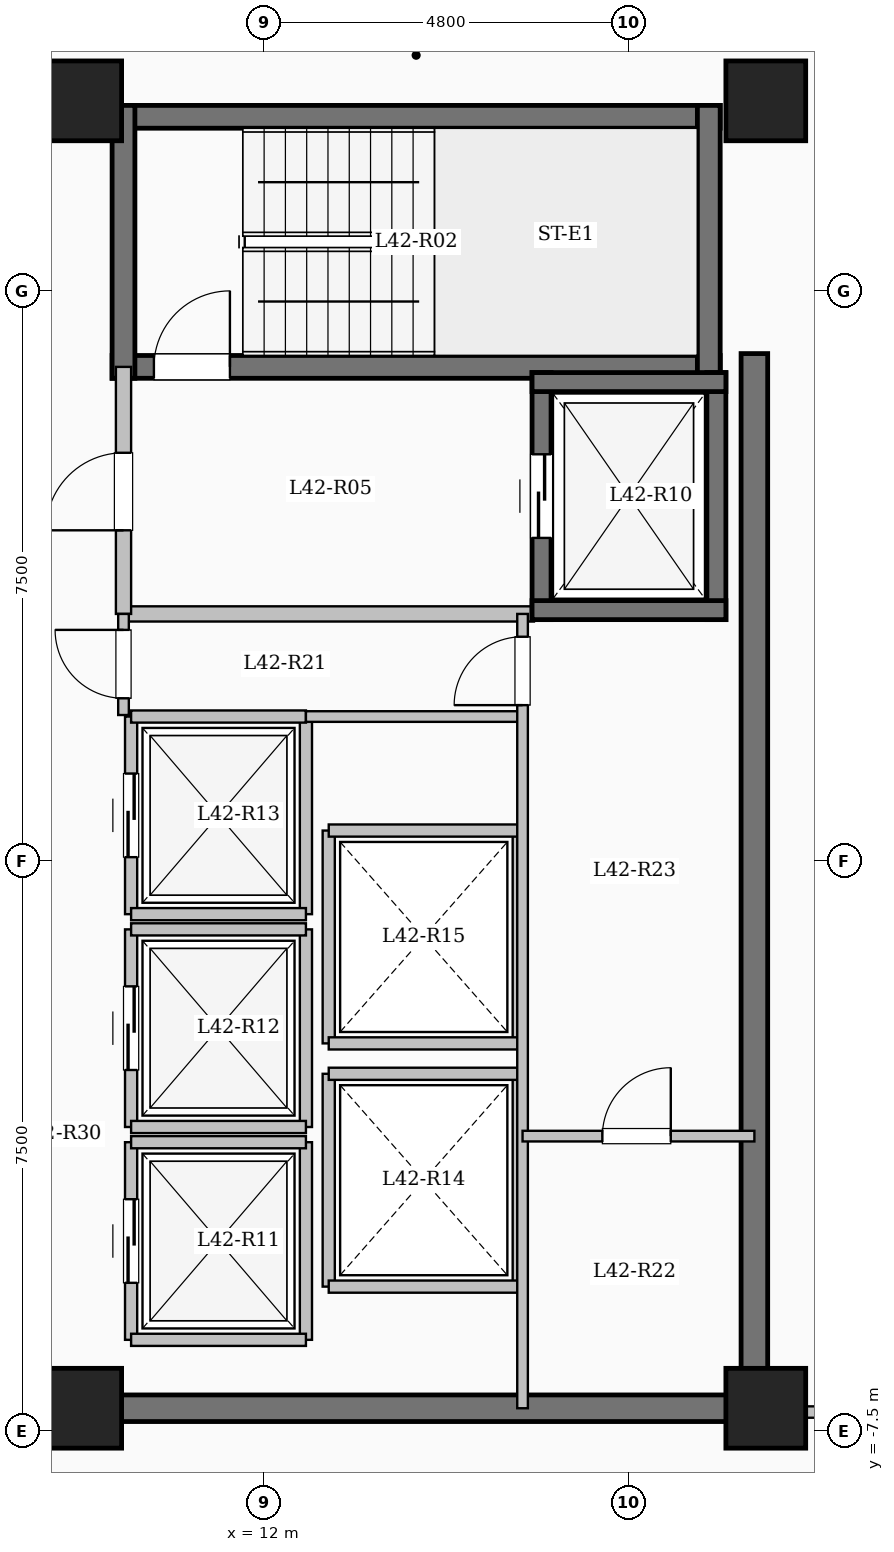
"""IFC4 building model, lengths in metres.
Left out: names, types, materials, properties, quantities, classifications, styles, units other than length and angle.
Written with IfcOpenShell. Run it as: python <this file> out.ifc"""

import sys

from ifc_helpers import new_model, si_unit, direction, frame, frame_2d, origin, origin_2d, place, context, subcontext, project, spatial, rectangle, extrude, element, fill, save


model = new_model("IFC4")
c1 = context("Model", 3, precision=1e-05, world=origin(), true_north=direction((0.0, 1.0)))
c2 = subcontext(c1, "Body", "Model", "MODEL_VIEW")
j1 = project(units=[si_unit("LENGTHUNIT", "METRE"), si_unit("PLANEANGLEUNIT", "RADIAN")], contexts=[c1])
p1 = place(None, origin())
s1 = spatial("IfcSite", under=j1, at=p1, CompositionType="ELEMENT")
p2 = place(p1, origin())
s2 = spatial("IfcBuilding", under=s1, at=p2, CompositionType="ELEMENT")
p3 = place(p2, frame((0.0, 0.0, 156.05)))
s3 = spatial("IfcBuildingStorey", under=s2, at=p3, CompositionType="ELEMENT", Elevation=156.05)
for number, where, z_axis, x_axis in (
    (1, (9.6, -7.2, 0.0), (0.0, 0.0, 1.0), (1.0, 0.0, 0.0)),
    (2, (9.6, 10.0, 0.0), (0.0, 0.0, 1.0), (1.0, 0.0, 0.0)),
    (3, (18.6, -7.2, 0.0), (0.0, 0.0, 1.0), (1.0, 0.0, 0.0)),
    (4, (18.6, 10.0, 0.0), (0.0, 0.0, 1.0), (1.0, 0.0, 0.0)),
):
    element("IfcColumn", number, at=place(p3, frame(where, z_axis=z_axis, x_axis=x_axis)), inside=s3, PredefinedType="COLUMN", context=c2, shape_type="SweptSolid", body=[
        extrude(rectangle(XDim=1.05, YDim=1.05, at=origin_2d()), origin(), (0.0, 0.0, 1.0), 3.35),
    ])
p4 = place(p3, frame((10.0, 9.79, 0.0), z_axis=(0.0, 0.0, 1.0), x_axis=(1.0, 0.0, 0.0)))
e5 = element("IfcWall", 5, at=p4, inside=s3, PredefinedType="SHEAR", context=c2, shape_type="SweptSolid", body=[
    extrude(rectangle(XDim=8.0, YDim=0.3, at=frame_2d((4.0, 0.0))), origin(), (0.0, 0.0, 1.0), 3.35),
])
p5 = place(p3, frame((10.0, 6.5, 0.0), z_axis=(0.0, 0.0, 1.0), x_axis=(1.0, 0.0, 0.0)))
e6 = element("IfcWall", 6, at=p5, inside=s3, PredefinedType="SHEAR", context=c2, shape_type="SweptSolid", body=[
    extrude(rectangle(XDim=8.0, YDim=0.3, at=frame_2d((4.0, 0.0))), origin(), (0.0, 0.0, 1.0), 3.35),
])
p6 = place(p5, frame((0.55, 0.0, 0.0)))
e7 = element("IfcOpeningElement", 7, at=p6, cuts=e6, PredefinedType="OPENING", context=c2, shape_type="SweptSolid", body=[
    extrude(rectangle(XDim=1.0, YDim=2.15, at=frame_2d((0.5, 1.075))), frame((0.0, 0.16, 0.0), z_axis=(0.0, -1.0, 0.0), x_axis=(1.0, 0.0, 0.0)), (0.0, 0.0, 1.0), 0.32),
])
for number, where, z_axis, x_axis in (
    (8, (10.15, 6.35, 0.0), (0.0, 0.0, 1.0), (0.0, 1.0, 0.0)),
    (9, (17.85, 6.35, 0.0), (0.0, 0.0, 1.0), (0.0, 1.0, 0.0)),
):
    element("IfcWall", number, at=place(p3, frame(where, z_axis=z_axis, x_axis=x_axis)), inside=s3, PredefinedType="SHEAR", context=c2, shape_type="SweptSolid", body=[
        extrude(rectangle(XDim=3.59, YDim=0.3, at=frame_2d((1.795, 0.0))), origin(), (0.0, 0.0, 1.0), 3.35),
    ])
p7 = place(p3, frame((10.15, 3.25, 0.0), z_axis=(0.0, 0.0, 1.0), x_axis=(1.0, 0.0, 0.0)))
e10 = element("IfcWall", 10, at=p7, inside=s3, PredefinedType="SOLIDWALL", context=c2, shape_type="SweptSolid", body=[
    extrude(rectangle(XDim=5.4, YDim=0.2, at=frame_2d((2.7, 0.0))), origin(), (0.0, 0.0, 1.0), 3.1),
])
p8 = place(p3, frame((10.15, 3.25, 0.0), z_axis=(0.0, 0.0, 1.0), x_axis=(0.0, 1.0, 0.0)))
e11 = element("IfcWall", 11, at=p8, inside=s3, PredefinedType="SOLIDWALL", context=c2, shape_type="SweptSolid", body=[
    extrude(rectangle(XDim=3.25, YDim=0.2, at=frame_2d((1.625, 0.0))), origin(), (0.0, 0.0, 1.0), 3.1),
])
p9 = place(p8, frame((1.1, 0.0, 0.0)))
e12 = element("IfcOpeningElement", 12, at=p9, cuts=e11, PredefinedType="OPENING", context=c2, shape_type="SweptSolid", body=[
    extrude(rectangle(XDim=1.02, YDim=2.15, at=frame_2d((0.51, 1.075))), frame((0.0, 0.11, 0.0), z_axis=(0.0, -1.0, 0.0), x_axis=(1.0, 0.0, 0.0)), (0.0, 0.0, 1.0), 0.22),
])
p10 = place(p3, frame((15.65, 3.175, 0.0), z_axis=(0.0, 0.0, 1.0), x_axis=(0.0, 1.0, 0.0)))
e13 = element("IfcWall", 13, at=p10, inside=s3, PredefinedType="SHEAR", context=c2, shape_type="SweptSolid", body=[
    extrude(rectangle(XDim=3.25, YDim=0.25, at=frame_2d((1.625, 0.0))), origin(), (0.0, 0.0, 1.0), 3.35),
])
p11 = place(p10, frame((1.075, 0.0, 0.0)))
e14 = element("IfcOpeningElement", 14, at=p11, cuts=e13, PredefinedType="OPENING", context=c2, shape_type="SweptSolid", body=[
    extrude(rectangle(XDim=1.1, YDim=2.15, at=frame_2d((0.55, 1.075))), frame((0.0, 0.135, 0.0), z_axis=(0.0, -1.0, 0.0), x_axis=(1.0, 0.0, 0.0)), (0.0, 0.0, 1.0), 0.27),
])
p12 = place(p3, frame((17.95, 3.175, 0.0), z_axis=(0.0, 0.0, 1.0), x_axis=(0.0, 1.0, 0.0)))
e15 = element("IfcWall", 15, at=p12, inside=s3, PredefinedType="SHEAR", context=c2, shape_type="SweptSolid", body=[
    extrude(rectangle(XDim=3.25, YDim=0.25, at=frame_2d((1.625, 0.0))), origin(), (0.0, 0.0, 1.0), 3.35),
])
for number, where, z_axis, x_axis in (
    (16, (15.525, 3.3, 0.0), (0.0, 0.0, 1.0), (1.0, 0.0, 0.0)),
    (17, (15.525, 6.3, 0.0), (0.0, 0.0, 1.0), (1.0, 0.0, 0.0)),
):
    element("IfcWall", number, at=place(p3, frame(where, z_axis=z_axis, x_axis=x_axis)), inside=s3, PredefinedType="SHEAR", context=c2, shape_type="SweptSolid", body=[
        extrude(rectangle(XDim=2.55, YDim=0.25, at=frame_2d((1.275, 0.0))), origin(), (0.0, 0.0, 1.0), 3.35),
    ])
p13 = place(p3, frame((10.25, -6.3, 0.0), z_axis=(0.0, 0.0, 1.0), x_axis=(0.0, 1.0, 0.0)))
e18 = element("IfcWall", 18, at=p13, inside=s3, PredefinedType="SOLIDWALL", context=c2, shape_type="SweptSolid", body=[
    extrude(rectangle(XDim=2.6, YDim=0.16, at=frame_2d((1.3, 0.0))), origin(), (0.0, 0.0, 1.0), 3.1),
])
p14 = place(p13, frame((0.75, 0.0, 0.0)))
e19 = element("IfcOpeningElement", 19, at=p14, cuts=e18, PredefinedType="OPENING", context=c2, shape_type="SweptSolid", body=[
    extrude(rectangle(XDim=1.1, YDim=2.15, at=frame_2d((0.55, 1.075))), frame((0.0, 0.09, 0.0), z_axis=(0.0, -1.0, 0.0), x_axis=(1.0, 0.0, 0.0)), (0.0, 0.0, 1.0), 0.18),
])
p15 = place(p3, frame((12.55, -6.3, 0.0), z_axis=(0.0, 0.0, 1.0), x_axis=(0.0, 1.0, 0.0)))
e20 = element("IfcWall", 20, at=p15, inside=s3, PredefinedType="SOLIDWALL", context=c2, shape_type="SweptSolid", body=[
    extrude(rectangle(XDim=2.6, YDim=0.16, at=frame_2d((1.3, 0.0))), origin(), (0.0, 0.0, 1.0), 3.1),
])
for number, where, z_axis, x_axis in (
    (21, (10.25, -6.3, 0.0), (0.0, 0.0, 1.0), (1.0, 0.0, 0.0)),
    (22, (10.25, -3.7, 0.0), (0.0, 0.0, 1.0), (1.0, 0.0, 0.0)),
):
    element("IfcWall", number, at=place(p3, frame(where, z_axis=z_axis, x_axis=x_axis)), inside=s3, PredefinedType="SOLIDWALL", context=c2, shape_type="SweptSolid", body=[
        extrude(rectangle(XDim=2.3, YDim=0.16, at=frame_2d((1.15, 0.0))), origin(), (0.0, 0.0, 1.0), 3.1),
    ])
p16 = place(p3, frame((10.25, -3.5, 0.0), z_axis=(0.0, 0.0, 1.0), x_axis=(0.0, 1.0, 0.0)))
e23 = element("IfcWall", 23, at=p16, inside=s3, PredefinedType="SOLIDWALL", context=c2, shape_type="SweptSolid", body=[
    extrude(rectangle(XDim=2.6, YDim=0.16, at=frame_2d((1.3, 0.0))), origin(), (0.0, 0.0, 1.0), 3.1),
])
p17 = place(p16, frame((0.75, 0.0, 0.0)))
e24 = element("IfcOpeningElement", 24, at=p17, cuts=e23, PredefinedType="OPENING", context=c2, shape_type="SweptSolid", body=[
    extrude(rectangle(XDim=1.1, YDim=2.15, at=frame_2d((0.55, 1.075))), frame((0.0, 0.09, 0.0), z_axis=(0.0, -1.0, 0.0), x_axis=(1.0, 0.0, 0.0)), (0.0, 0.0, 1.0), 0.18),
])
p18 = place(p3, frame((12.55, -3.5, 0.0), z_axis=(0.0, 0.0, 1.0), x_axis=(0.0, 1.0, 0.0)))
e25 = element("IfcWall", 25, at=p18, inside=s3, PredefinedType="SOLIDWALL", context=c2, shape_type="SweptSolid", body=[
    extrude(rectangle(XDim=2.6, YDim=0.16, at=frame_2d((1.3, 0.0))), origin(), (0.0, 0.0, 1.0), 3.1),
])
for number, where, z_axis, x_axis in (
    (26, (10.25, -3.5, 0.0), (0.0, 0.0, 1.0), (1.0, 0.0, 0.0)),
    (27, (10.25, -0.9, 0.0), (0.0, 0.0, 1.0), (1.0, 0.0, 0.0)),
):
    element("IfcWall", number, at=place(p3, frame(where, z_axis=z_axis, x_axis=x_axis)), inside=s3, PredefinedType="SOLIDWALL", context=c2, shape_type="SweptSolid", body=[
        extrude(rectangle(XDim=2.3, YDim=0.16, at=frame_2d((1.15, 0.0))), origin(), (0.0, 0.0, 1.0), 3.1),
    ])
p19 = place(p3, frame((10.25, -0.7, 0.0), z_axis=(0.0, 0.0, 1.0), x_axis=(0.0, 1.0, 0.0)))
e28 = element("IfcWall", 28, at=p19, inside=s3, PredefinedType="SOLIDWALL", context=c2, shape_type="SweptSolid", body=[
    extrude(rectangle(XDim=2.6, YDim=0.16, at=frame_2d((1.3, 0.0))), origin(), (0.0, 0.0, 1.0), 3.1),
])
p20 = place(p19, frame((0.75, 0.0, 0.0)))
e29 = element("IfcOpeningElement", 29, at=p20, cuts=e28, PredefinedType="OPENING", context=c2, shape_type="SweptSolid", body=[
    extrude(rectangle(XDim=1.1, YDim=2.15, at=frame_2d((0.55, 1.075))), frame((0.0, 0.09, 0.0), z_axis=(0.0, -1.0, 0.0), x_axis=(1.0, 0.0, 0.0)), (0.0, 0.0, 1.0), 0.18),
])
p21 = place(p3, frame((12.55, -0.7, 0.0), z_axis=(0.0, 0.0, 1.0), x_axis=(0.0, 1.0, 0.0)))
e30 = element("IfcWall", 30, at=p21, inside=s3, PredefinedType="SOLIDWALL", context=c2, shape_type="SweptSolid", body=[
    extrude(rectangle(XDim=2.6, YDim=0.16, at=frame_2d((1.3, 0.0))), origin(), (0.0, 0.0, 1.0), 3.1),
])
for number, where, z_axis, x_axis in (
    (31, (10.25, -0.7, 0.0), (0.0, 0.0, 1.0), (1.0, 0.0, 0.0)),
    (32, (10.25, 1.9, 0.0), (0.0, 0.0, 1.0), (1.0, 0.0, 0.0)),
):
    element("IfcWall", number, at=place(p3, frame(where, z_axis=z_axis, x_axis=x_axis)), inside=s3, PredefinedType="SOLIDWALL", context=c2, shape_type="SweptSolid", body=[
        extrude(rectangle(XDim=2.3, YDim=0.16, at=frame_2d((1.15, 0.0))), origin(), (0.0, 0.0, 1.0), 3.1),
    ])
for number, where, z_axis, x_axis in (
    (33, (12.85, -5.6, 0.0), (0.0, 0.0, 1.0), (0.0, 1.0, 0.0)),
    (34, (15.35, -5.6, 0.0), (0.0, 0.0, 1.0), (0.0, 1.0, 0.0)),
):
    element("IfcWall", number, at=place(p3, frame(where, z_axis=z_axis, x_axis=x_axis)), inside=s3, PredefinedType="SOLIDWALL", context=c2, shape_type="SweptSolid", body=[
        extrude(rectangle(XDim=2.8, YDim=0.16, at=frame_2d((1.4, 0.0))), origin(), (0.0, 0.0, 1.0), 3.1),
    ])
for number, where, z_axis, x_axis in (
    (35, (12.85, -5.6, 0.0), (0.0, 0.0, 1.0), (1.0, 0.0, 0.0)),
    (36, (12.85, -2.8, 0.0), (0.0, 0.0, 1.0), (1.0, 0.0, 0.0)),
):
    element("IfcWall", number, at=place(p3, frame(where, z_axis=z_axis, x_axis=x_axis)), inside=s3, PredefinedType="SOLIDWALL", context=c2, shape_type="SweptSolid", body=[
        extrude(rectangle(XDim=2.5, YDim=0.16, at=frame_2d((1.25, 0.0))), origin(), (0.0, 0.0, 1.0), 3.1),
    ])
for number, where, z_axis, x_axis in (
    (37, (12.85, -2.4, 0.0), (0.0, 0.0, 1.0), (0.0, 1.0, 0.0)),
    (38, (15.35, -2.4, 0.0), (0.0, 0.0, 1.0), (0.0, 1.0, 0.0)),
):
    element("IfcWall", number, at=place(p3, frame(where, z_axis=z_axis, x_axis=x_axis)), inside=s3, PredefinedType="SOLIDWALL", context=c2, shape_type="SweptSolid", body=[
        extrude(rectangle(XDim=2.8, YDim=0.16, at=frame_2d((1.4, 0.0))), origin(), (0.0, 0.0, 1.0), 3.1),
    ])
for number, where, z_axis, x_axis in (
    (39, (12.85, -2.4, 0.0), (0.0, 0.0, 1.0), (1.0, 0.0, 0.0)),
    (40, (12.85, 0.4, 0.0), (0.0, 0.0, 1.0), (1.0, 0.0, 0.0)),
):
    element("IfcWall", number, at=place(p3, frame(where, z_axis=z_axis, x_axis=x_axis)), inside=s3, PredefinedType="SOLIDWALL", context=c2, shape_type="SweptSolid", body=[
        extrude(rectangle(XDim=2.5, YDim=0.16, at=frame_2d((1.25, 0.0))), origin(), (0.0, 0.0, 1.0), 3.1),
    ])
p22 = place(p3, frame((18.45, -7.375, 0.0), z_axis=(0.0, 0.0, 1.0), x_axis=(0.0, 1.0, 0.0)))
e41 = element("IfcWall", 41, at=p22, inside=s3, PredefinedType="SHEAR", context=c2, shape_type="SweptSolid", body=[
    extrude(rectangle(XDim=14.05, YDim=0.35, at=frame_2d((7.025, 0.0))), origin(), (0.0, 0.0, 1.0), 3.35),
])
p23 = place(p3, frame((10.075, -7.2, 0.0), z_axis=(0.0, 0.0, 1.0), x_axis=(1.0, 0.0, 0.0)))
e42 = element("IfcWall", 42, at=p23, inside=s3, PredefinedType="SHEAR", context=c2, shape_type="SweptSolid", body=[
    extrude(rectangle(XDim=8.55, YDim=0.35, at=frame_2d((4.275, 0.0))), origin(), (0.0, 0.0, 1.0), 3.35),
])
p24 = place(p3, frame((12.55, 1.9, 0.0), z_axis=(0.0, 0.0, 1.0), x_axis=(1.0, 0.0, 0.0)))
e43 = element("IfcWall", 43, at=p24, inside=s3, PredefinedType="PARTITIONING", context=c2, shape_type="SweptSolid", body=[
    extrude(rectangle(XDim=2.85, YDim=0.14, at=frame_2d((1.425, 0.0))), origin(), (0.0, 0.0, 1.0), 3.1),
])
p25 = place(p3, frame((10.15, 1.92, 0.0), z_axis=(0.0, 0.0, 1.0), x_axis=(0.0, 1.0, 0.0)))
e44 = element("IfcWall", 44, at=p25, inside=s3, PredefinedType="PARTITIONING", context=c2, shape_type="SweptSolid", body=[
    extrude(rectangle(XDim=1.33, YDim=0.14, at=frame_2d((0.665, 0.0))), origin(), (0.0, 0.0, 1.0), 3.1),
])
p26 = place(p25, frame((0.22, 0.0, 0.0)))
e45 = element("IfcOpeningElement", 45, at=p26, cuts=e44, PredefinedType="OPENING", context=c2, shape_type="SweptSolid", body=[
    extrude(rectangle(XDim=0.9, YDim=2.08, at=frame_2d((0.45, 1.04))), frame((0.0, 0.08, 0.0), z_axis=(0.0, -1.0, 0.0), x_axis=(1.0, 0.0, 0.0)), (0.0, 0.0, 1.0), 0.16),
])
p27 = place(p3, frame((15.4, -7.2, 0.0), z_axis=(0.0, 0.0, 1.0), x_axis=(0.0, 1.0, 0.0)))
e46 = element("IfcWall", 46, at=p27, inside=s3, PredefinedType="PARTITIONING", context=c2, shape_type="SweptSolid", body=[
    extrude(rectangle(XDim=10.45, YDim=0.14, at=frame_2d((5.225, 0.0))), origin(), (0.0, 0.0, 1.0), 3.1),
])
p28 = place(p27, frame((9.25, 0.0, 0.0)))
e47 = element("IfcOpeningElement", 47, at=p28, cuts=e46, PredefinedType="OPENING", context=c2, shape_type="SweptSolid", body=[
    extrude(rectangle(XDim=0.9, YDim=2.08, at=frame_2d((0.45, 1.04))), frame((0.0, 0.08, 0.0), z_axis=(0.0, -1.0, 0.0), x_axis=(1.0, 0.0, 0.0)), (0.0, 0.0, 1.0), 0.16),
])
p29 = place(p3, frame((15.4, -3.62, 0.0), z_axis=(0.0, 0.0, 1.0), x_axis=(1.0, 0.0, 0.0)))
e48 = element("IfcWall", 48, at=p29, inside=s3, PredefinedType="PARTITIONING", context=c2, shape_type="SweptSolid", body=[
    extrude(rectangle(XDim=3.05, YDim=0.14, at=frame_2d((1.525, 0.0))), origin(), (0.0, 0.0, 1.0), 3.1),
])
p30 = place(p29, frame((1.05, 0.0, 0.0)))
e49 = element("IfcOpeningElement", 49, at=p30, cuts=e48, PredefinedType="OPENING", context=c2, shape_type="SweptSolid", body=[
    extrude(rectangle(XDim=0.9, YDim=2.08, at=frame_2d((0.45, 1.04))), frame((0.0, 0.08, 0.0), z_axis=(0.0, -1.0, 0.0), x_axis=(1.0, 0.0, 0.0)), (0.0, 0.0, 1.0), 0.16),
])
p31 = place(p3, frame((18.45, -7.25, 0.0), z_axis=(0.0, 0.0, 1.0), x_axis=(1.0, 0.0, 0.0)))
e50 = element("IfcWall", 50, at=p31, inside=s3, PredefinedType="PARTITIONING", context=c2, shape_type="SweptSolid", body=[
    extrude(rectangle(XDim=6.63, YDim=0.15, at=frame_2d((3.315, 0.0))), origin(), (0.0, 0.0, 1.0), 3.1),
])
p32 = place(p31, frame((1.95, 0.0, 0.0)))
e51 = element("IfcOpeningElement", 51, at=p32, cuts=e50, PredefinedType="OPENING", context=c2, shape_type="SweptSolid", body=[
    extrude(rectangle(XDim=1.08, YDim=2.15, at=frame_2d((0.54, 1.075))), frame((0.0, 0.085, 0.0), z_axis=(0.0, -1.0, 0.0), x_axis=(1.0, 0.0, 0.0)), (0.0, 0.0, 1.0), 0.17),
])
p33 = place(p6, origin())
e52 = element("IfcDoor", 52, at=p33, inside=s3, OperationType="SINGLE_SWING_RIGHT", PredefinedType="DOOR", context=c2, shape_type="SweptSolid", body=[
    extrude(rectangle(XDim=1.0, YDim=2.15, at=frame_2d((0.5, 1.075))), frame((0.0, 0.025, 0.0), z_axis=(0.0, -1.0, 0.0), x_axis=(1.0, 0.0, 0.0)), (0.0, 0.0, 1.0), 0.05),
])
fill(e7, e52)
p34 = place(p9, origin())
e53 = element("IfcDoor", 53, at=p34, inside=s3, OperationType="SINGLE_SWING_LEFT", PredefinedType="DOOR", context=c2, shape_type="SweptSolid", body=[
    extrude(rectangle(XDim=1.02, YDim=2.15, at=frame_2d((0.51, 1.075))), frame((0.0, 0.025, 0.0), z_axis=(0.0, -1.0, 0.0), x_axis=(1.0, 0.0, 0.0)), (0.0, 0.0, 1.0), 0.05),
])
fill(e12, e53)
p35 = place(p11, origin())
e54 = element("IfcDoor", 54, at=p35, inside=s3, OperationType="SLIDING_TO_LEFT", PredefinedType="DOOR", context=c2, shape_type="SweptSolid", body=[
    extrude(rectangle(XDim=1.1, YDim=2.15, at=frame_2d((0.55, 1.075))), frame((0.0, 0.025, 0.0), z_axis=(0.0, -1.0, 0.0), x_axis=(1.0, 0.0, 0.0)), (0.0, 0.0, 1.0), 0.05),
])
fill(e14, e54)
p36 = place(p14, origin())
e55 = element("IfcDoor", 55, at=p36, inside=s3, OperationType="SLIDING_TO_LEFT", PredefinedType="DOOR", context=c2, shape_type="SweptSolid", body=[
    extrude(rectangle(XDim=1.1, YDim=2.15, at=frame_2d((0.55, 1.075))), frame((0.0, 0.025, 0.0), z_axis=(0.0, -1.0, 0.0), x_axis=(1.0, 0.0, 0.0)), (0.0, 0.0, 1.0), 0.05),
])
fill(e19, e55)
p37 = place(p17, origin())
e56 = element("IfcDoor", 56, at=p37, inside=s3, OperationType="SLIDING_TO_LEFT", PredefinedType="DOOR", context=c2, shape_type="SweptSolid", body=[
    extrude(rectangle(XDim=1.1, YDim=2.15, at=frame_2d((0.55, 1.075))), frame((0.0, 0.025, 0.0), z_axis=(0.0, -1.0, 0.0), x_axis=(1.0, 0.0, 0.0)), (0.0, 0.0, 1.0), 0.05),
])
fill(e24, e56)
p38 = place(p20, origin())
e57 = element("IfcDoor", 57, at=p38, inside=s3, OperationType="SLIDING_TO_LEFT", PredefinedType="DOOR", context=c2, shape_type="SweptSolid", body=[
    extrude(rectangle(XDim=1.1, YDim=2.15, at=frame_2d((0.55, 1.075))), frame((0.0, 0.025, 0.0), z_axis=(0.0, -1.0, 0.0), x_axis=(1.0, 0.0, 0.0)), (0.0, 0.0, 1.0), 0.05),
])
fill(e29, e57)
p39 = place(p26, origin())
e58 = element("IfcDoor", 58, at=p39, inside=s3, OperationType="SINGLE_SWING_RIGHT", PredefinedType="DOOR", context=c2, shape_type="SweptSolid", body=[
    extrude(rectangle(XDim=0.9, YDim=2.08, at=frame_2d((0.45, 1.04))), frame((0.0, 0.025, 0.0), z_axis=(0.0, -1.0, 0.0), x_axis=(1.0, 0.0, 0.0)), (0.0, 0.0, 1.0), 0.05),
])
fill(e45, e58)
p40 = place(p28, origin())
e59 = element("IfcDoor", 59, at=p40, inside=s3, OperationType="SINGLE_SWING_LEFT", PredefinedType="DOOR", context=c2, shape_type="SweptSolid", body=[
    extrude(rectangle(XDim=0.9, YDim=2.08, at=frame_2d((0.45, 1.04))), frame((0.0, 0.025, 0.0), z_axis=(0.0, -1.0, 0.0), x_axis=(1.0, 0.0, 0.0)), (0.0, 0.0, 1.0), 0.05),
])
fill(e47, e59)
p41 = place(p30, origin())
e60 = element("IfcDoor", 60, at=p41, inside=s3, OperationType="SINGLE_SWING_RIGHT", PredefinedType="DOOR", context=c2, shape_type="SweptSolid", body=[
    extrude(rectangle(XDim=0.9, YDim=2.08, at=frame_2d((0.45, 1.04))), frame((0.0, 0.025, 0.0), z_axis=(0.0, -1.0, 0.0), x_axis=(1.0, 0.0, 0.0)), (0.0, 0.0, 1.0), 0.05),
])
fill(e49, e60)
save(model, sys.argv[1])
